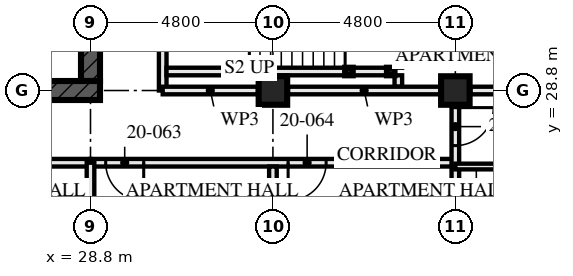
"""IFC4 building model, lengths in metres.
Left out: names, types, materials, properties, quantities, classifications, styles, units other than length and angle.
Written with IfcOpenShell. Run it as: python <this file> out.ifc"""

import sys

from ifc_helpers import new_model, si_unit, direction, frame, frame_2d, origin, origin_2d, place, context, subcontext, project, spatial, rectangle, hollow_rectangle, extrude, element, fill, save


model = new_model("IFC4")
c1 = context("Model", 3, precision=1e-05, world=origin(), true_north=direction((0.0, 1.0)))
c2 = subcontext(c1, "Body", "Model", "MODEL_VIEW")
j1 = project(units=[si_unit("LENGTHUNIT", "METRE"), si_unit("PLANEANGLEUNIT", "RADIAN")], contexts=[c1])
p1 = place(None, origin())
s1 = spatial("IfcSite", under=j1, at=p1, CompositionType="ELEMENT")
p2 = place(p1, origin())
s2 = spatial("IfcBuilding", under=s1, at=p2, CompositionType="ELEMENT")
p3 = place(p2, frame((0.0, 0.0, 76.0)))
s3 = spatial("IfcBuildingStorey", under=s2, at=p3, CompositionType="ELEMENT", Elevation=76.0)
for number, where, z_axis, x_axis in (
    (1, (33.6, 28.8, 0.0), (0.0, 0.0, 1.0), (0.0, 1.0, 0.0)),
    (2, (38.4, 28.8, 0.0), (0.0, 0.0, 1.0), (0.0, 1.0, 0.0)),
):
    element("IfcColumn", number, at=place(p3, frame(where, z_axis=z_axis, x_axis=x_axis)), inside=s3, PredefinedType="COLUMN", context=c2, shape_type="SweptSolid", body=[
        extrude(hollow_rectangle(XDim=0.75, YDim=0.75, WallThickness=0.08, at=origin_2d()), origin(), (0.0, 0.0, 1.0), 3.5),
    ])
p4 = place(p3, frame((14.15, 28.8, -0.17), z_axis=(0.0, 0.0, 1.0), x_axis=(1.0, 0.0, 0.0)))
e3 = element("IfcWall", 3, at=p4, inside=s3, PredefinedType="SHEAR", context=c2, shape_type="SweptSolid", body=[
    extrude(rectangle(XDim=14.9, YDim=0.5, at=frame_2d((7.45, 0.0))), origin(), (0.0, 0.0, 1.0), 3.42),
])
p5 = place(p4, frame((6.85, 0.0, 0.17)))
e4 = element("IfcOpeningElement", 4, at=p5, cuts=e3, PredefinedType="OPENING", context=c2, shape_type="SweptSolid", body=[
    extrude(rectangle(XDim=1.2, YDim=2.1, at=frame_2d((0.6, 1.05))), frame((0.0, 0.26, 0.0), z_axis=(0.0, -1.0, 0.0), x_axis=(1.0, 0.0, 0.0)), (0.0, 0.0, 1.0), 0.521),
])
p6 = place(p3, frame((28.8, 29.05, -0.17), z_axis=(0.0, 0.0, 1.0), x_axis=(0.0, 1.0, 0.0)))
e5 = element("IfcWall", 5, at=p6, inside=s3, PredefinedType="SHEAR", context=c2, shape_type="SweptSolid", body=[
    extrude(rectangle(XDim=13.9, YDim=0.5, at=frame_2d((6.95, 0.0))), origin(), (0.0, 0.0, 1.0), 3.42),
])
p7 = place(p6, frame((6.35, 0.0, 0.17)))
e6 = element("IfcOpeningElement", 6, at=p7, cuts=e5, PredefinedType="OPENING", context=c2, shape_type="SweptSolid", body=[
    extrude(rectangle(XDim=1.2, YDim=2.1, at=frame_2d((0.6, 1.05))), frame((0.0, 0.26, 0.0), z_axis=(0.0, -1.0, 0.0), x_axis=(1.0, 0.0, 0.0)), (0.0, 0.0, 1.0), 0.521),
])
for number, where, z_axis, x_axis in (
    (7, (36.7, 29.3, 0.0), (0.0, 0.0, 1.0), (1.0, 0.0, 0.0)),
    (8, (35.6, 29.3, 0.0), (0.0, 0.0, 1.0), (1.0, 0.0, 0.0)),
):
    element("IfcColumn", number, at=place(p3, frame(where, z_axis=z_axis, x_axis=x_axis)), inside=s3, PredefinedType="COLUMN", context=c2, shape_type="SweptSolid", body=[
        extrude(hollow_rectangle(XDim=0.2, YDim=0.2, WallThickness=0.008, at=origin_2d()), origin(), (0.0, 0.0, 1.0), 3.25),
    ])
p8 = place(p3, frame((14.4, 26.9, 0.0), z_axis=(0.0, 0.0, 1.0), x_axis=(1.0, 0.0, 0.0)))
e9 = element("IfcWall", 9, at=p8, inside=s3, PredefinedType="PARTITIONING", context=c2, shape_type="SweptSolid", body=[
    extrude(rectangle(XDim=14.4, YDim=0.2, at=frame_2d((7.2, 0.0))), origin(), (0.0, 0.0, 1.0), 2.04),
])
p9 = place(p8, frame((1.4, 0.0, 0.0)))
e10 = element("IfcOpeningElement", 10, at=p9, cuts=e9, PredefinedType="OPENING", context=c2, shape_type="SweptSolid", body=[
    extrude(rectangle(XDim=1.0, YDim=2.0, at=frame_2d((0.5, 1.0))), frame((0.0, 0.111, 0.0), z_axis=(0.0, -1.0, 0.0), x_axis=(1.0, 0.0, 0.0)), (0.0, 0.0, 1.0), 0.221),
])
p10 = place(p8, frame((3.65, 0.0, 0.0)))
e11 = element("IfcOpeningElement", 11, at=p10, cuts=e9, PredefinedType="OPENING", context=c2, shape_type="SweptSolid", body=[
    extrude(rectangle(XDim=0.9, YDim=2.0, at=frame_2d((0.45, 1.0))), frame((0.0, 0.111, 0.0), z_axis=(0.0, -1.0, 0.0), x_axis=(1.0, 0.0, 0.0)), (0.0, 0.0, 1.0), 0.221),
])
p11 = place(p8, frame((5.2, 0.0, 0.0)))
e12 = element("IfcOpeningElement", 12, at=p11, cuts=e9, PredefinedType="OPENING", context=c2, shape_type="SweptSolid", body=[
    extrude(rectangle(XDim=1.0, YDim=2.0, at=frame_2d((0.5, 1.0))), frame((0.0, 0.111, 0.0), z_axis=(0.0, -1.0, 0.0), x_axis=(1.0, 0.0, 0.0)), (0.0, 0.0, 1.0), 0.221),
])
p12 = place(p8, frame((10.0, 0.0, 0.0)))
e13 = element("IfcOpeningElement", 13, at=p12, cuts=e9, PredefinedType="OPENING", context=c2, shape_type="SweptSolid", body=[
    extrude(rectangle(XDim=1.0, YDim=2.0, at=frame_2d((0.5, 1.0))), frame((0.0, 0.111, 0.0), z_axis=(0.0, -1.0, 0.0), x_axis=(1.0, 0.0, 0.0)), (0.0, 0.0, 1.0), 0.221),
])
p13 = place(p3, frame((33.6, 14.72, 0.0), z_axis=(0.0, 0.0, 1.0), x_axis=(0.0, 1.0, 0.0)))
e14 = element("IfcWall", 14, at=p13, inside=s3, PredefinedType="PARTITIONING", context=c2, shape_type="SweptSolid", body=[
    extrude(rectangle(XDim=12.08, YDim=0.2, at=frame_2d((6.04, 0.0))), origin(), (0.0, 0.0, 1.0), 2.04),
])
p14 = place(p3, frame((38.4, 19.52, 0.0), z_axis=(0.0, 0.0, 1.0), x_axis=(0.0, 1.0, 0.0)))
e15 = element("IfcWall", 15, at=p14, inside=s3, PredefinedType="PARTITIONING", context=c2, shape_type="SweptSolid", body=[
    extrude(rectangle(XDim=7.28, YDim=0.2, at=frame_2d((3.64, 0.0))), origin(), (0.0, 0.0, 1.0), 2.04),
])
p15 = place(p3, frame((38.4, 26.8, 0.0), z_axis=(0.0, 0.0, 1.0), x_axis=(1.0, 0.0, 0.0)))
e16 = element("IfcWall", 16, at=p15, inside=s3, PredefinedType="PARTITIONING", context=c2, shape_type="SweptSolid", body=[
    extrude(rectangle(XDim=2.8, YDim=0.15, at=frame_2d((1.4, 0.0))), origin(), (0.0, 0.0, 1.0), 3.25),
])
p16 = place(p3, frame((28.8, 26.9, 0.0), z_axis=(0.0, 0.0, 1.0), x_axis=(1.0, 0.0, 0.0)))
e17 = element("IfcWall", 17, at=p16, inside=s3, PredefinedType="PARTITIONING", context=c2, shape_type="SweptSolid", body=[
    extrude(rectangle(XDim=9.6, YDim=0.2, at=frame_2d((4.8, 0.0))), origin(), (0.0, 0.0, 1.0), 3.25),
])
p17 = place(p16, frame((0.4, 0.0, 0.0)))
e18 = element("IfcOpeningElement", 18, at=p17, cuts=e17, PredefinedType="OPENING", context=c2, shape_type="SweptSolid", body=[
    extrude(rectangle(XDim=1.0, YDim=2.1, at=frame_2d((0.5, 1.05))), frame((0.0, 0.111, 0.0), z_axis=(0.0, -1.0, 0.0), x_axis=(1.0, 0.0, 0.0)), (0.0, 0.0, 1.0), 0.221),
])
p18 = place(p16, frame((5.2, 0.0, 0.0)))
e19 = element("IfcOpeningElement", 19, at=p18, cuts=e17, PredefinedType="OPENING", context=c2, shape_type="SweptSolid", body=[
    extrude(rectangle(XDim=1.0, YDim=2.1, at=frame_2d((0.5, 1.05))), frame((0.0, 0.111, 0.0), z_axis=(0.0, -1.0, 0.0), x_axis=(1.0, 0.0, 0.0)), (0.0, 0.0, 1.0), 0.221),
])
p19 = place(p3, frame((38.4, 26.8, 0.0), z_axis=(0.0, 0.0, 1.0), x_axis=(0.0, 1.0, 0.0)))
e20 = element("IfcWall", 20, at=p19, inside=s3, PredefinedType="PARTITIONING", context=c2, shape_type="SweptSolid", body=[
    extrude(rectangle(XDim=1.605, YDim=0.2, at=frame_2d((0.802, 0.0))), origin(), (0.0, 0.0, 1.0), 3.25),
])
p20 = place(p19, frame((0.55, 0.0, 0.0)))
e21 = element("IfcOpeningElement", 21, at=p20, cuts=e20, PredefinedType="OPENING", context=c2, shape_type="SweptSolid", body=[
    extrude(rectangle(XDim=1.0, YDim=2.1, at=frame_2d((0.5, 1.05))), frame((0.0, 0.111, 0.0), z_axis=(0.0, -1.0, 0.0), x_axis=(1.0, 0.0, 0.0)), (0.0, 0.0, 1.0), 0.221),
])
p21 = place(p3, frame((36.6, 29.3, 0.0), z_axis=(0.0, 0.0, 1.0), x_axis=(-1.0, 0.0, 0.0)))
e22 = element("IfcWall", 22, at=p21, inside=s3, PredefinedType="SOLIDWALL", context=c2, shape_type="SweptSolid", body=[
    extrude(rectangle(XDim=0.9, YDim=0.2, at=frame_2d((0.45, 0.0))), origin(), (0.0, 0.0, 1.0), 2.94),
])
p22 = place(p3, frame((35.5, 29.3, 0.0), z_axis=(0.0, 0.0, 1.0), x_axis=(-1.0, 0.0, 0.0)))
e23 = element("IfcWall", 23, at=p22, inside=s3, PredefinedType="SOLIDWALL", context=c2, shape_type="SweptSolid", body=[
    extrude(rectangle(XDim=4.7, YDim=0.2, at=frame_2d((2.35, 0.0))), origin(), (0.0, 0.0, 1.0), 2.94),
])
p23 = place(p3, frame((36.9, 28.9, 0.0), z_axis=(0.0, 0.0, 1.0), x_axis=(0.0, 1.0, 0.0)))
e24 = element("IfcWall", 24, at=p23, inside=s3, PredefinedType="SOLIDWALL", context=c2, shape_type="SweptSolid", body=[
    extrude(rectangle(XDim=0.3, YDim=0.2, at=frame_2d((0.15, 0.0))), origin(), (0.0, 0.0, 1.0), 3.25),
])
p24 = place(p3, frame((36.9, 29.4, 0.0), z_axis=(0.0, 0.0, 1.0), x_axis=(0.0, 1.0, 0.0)))
e25 = element("IfcWall", 25, at=p24, inside=s3, PredefinedType="SOLIDWALL", context=c2, shape_type="SweptSolid", body=[
    extrude(rectangle(XDim=2.6, YDim=0.2, at=frame_2d((1.3, 0.0))), origin(), (0.0, 0.0, 1.0), 3.25),
])
p25 = place(p3, frame((30.7, 28.8, 0.0), z_axis=(0.0, 0.0, 1.0), x_axis=(0.0, 1.0, 0.0)))
e26 = element("IfcWall", 26, at=p25, inside=s3, PredefinedType="PARTITIONING", context=c2, shape_type="SweptSolid", body=[
    extrude(rectangle(XDim=14.4, YDim=0.2, at=frame_2d((7.2, 0.0))), origin(), (0.0, 0.0, 1.0), 2.04),
])
p26 = place(p25, frame((1.4, 0.0, 0.0)))
e27 = element("IfcOpeningElement", 27, at=p26, cuts=e26, PredefinedType="OPENING", context=c2, shape_type="SweptSolid", body=[
    extrude(rectangle(XDim=1.0, YDim=2.0, at=frame_2d((0.5, 1.0))), frame((0.0, 0.111, 0.0), z_axis=(0.0, -1.0, 0.0), x_axis=(1.0, 0.0, 0.0)), (0.0, 0.0, 1.0), 0.221),
])
p27 = place(p25, frame((4.1, 0.0, 0.0)))
e28 = element("IfcOpeningElement", 28, at=p27, cuts=e26, PredefinedType="OPENING", context=c2, shape_type="SweptSolid", body=[
    extrude(rectangle(XDim=1.0, YDim=2.0, at=frame_2d((0.5, 1.0))), frame((0.0, 0.111, 0.0), z_axis=(0.0, -1.0, 0.0), x_axis=(1.0, 0.0, 0.0)), (0.0, 0.0, 1.0), 0.221),
])
p28 = place(p25, frame((5.975, 0.0, 0.0)))
e29 = element("IfcOpeningElement", 29, at=p28, cuts=e26, PredefinedType="OPENING", context=c2, shape_type="SweptSolid", body=[
    extrude(rectangle(XDim=1.0, YDim=2.0, at=frame_2d((0.5, 1.0))), frame((0.0, 0.111, 0.0), z_axis=(0.0, -1.0, 0.0), x_axis=(1.0, 0.0, 0.0)), (0.0, 0.0, 1.0), 0.221),
])
p29 = place(p25, frame((10.0, 0.0, 0.0)))
e30 = element("IfcOpeningElement", 30, at=p29, cuts=e26, PredefinedType="OPENING", context=c2, shape_type="SweptSolid", body=[
    extrude(rectangle(XDim=1.0, YDim=2.0, at=frame_2d((0.5, 1.0))), frame((0.0, 0.111, 0.0), z_axis=(0.0, -1.0, 0.0), x_axis=(1.0, 0.0, 0.0)), (0.0, 0.0, 1.0), 0.221),
])
p30 = place(p3, frame((28.8, 24.395, 0.0), z_axis=(0.0, 0.0, 1.0), x_axis=(0.0, 1.0, 0.0)))
e31 = element("IfcWall", 31, at=p30, inside=s3, PredefinedType="PARTITIONING", context=c2, shape_type="SweptSolid", body=[
    extrude(rectangle(XDim=2.505, YDim=0.2, at=frame_2d((1.252, 0.0))), origin(), (0.0, 0.0, 1.0), 2.04),
])
p31 = place(p3, frame((42.88, 28.8, 0.0), z_axis=(0.0, 0.0, 1.0), x_axis=(-1.0, 0.0, 0.0)))
e32 = element("IfcWall", 32, at=p31, inside=s3, PredefinedType="PARTITIONING", context=c2, shape_type="SweptSolid", body=[
    extrude(rectangle(XDim=4.085, YDim=0.2, at=frame_2d((2.042, 0.0))), origin(), (0.0, 0.0, 1.0), 2.04),
])
p32 = place(p3, frame((38.005, 28.8, 0.0), z_axis=(0.0, 0.0, 1.0), x_axis=(-1.0, 0.0, 0.0)))
e33 = element("IfcWall", 33, at=p32, inside=s3, PredefinedType="PARTITIONING", context=c2, shape_type="SweptSolid", body=[
    extrude(rectangle(XDim=4.01, YDim=0.2, at=frame_2d((2.005, 0.0))), origin(), (0.0, 0.0, 1.0), 2.04),
])
p33 = place(p3, frame((33.205, 28.8, 0.0), z_axis=(0.0, 0.0, 1.0), x_axis=(-1.0, 0.0, 0.0)))
e34 = element("IfcWall", 34, at=p33, inside=s3, PredefinedType="PARTITIONING", context=c2, shape_type="SweptSolid", body=[
    extrude(rectangle(XDim=2.505, YDim=0.2, at=frame_2d((1.252, 0.0))), origin(), (0.0, 0.0, 1.0), 2.04),
])
p34 = place(p17, frame((1.0, 0.0, 0.0), z_axis=(0.0, 0.0, 1.0), x_axis=(-1.0, 0.0, 0.0)))
e35 = element("IfcDoor", 35, at=p34, inside=s3, OperationType="SINGLE_SWING_RIGHT", PredefinedType="DOOR", context=c2, shape_type="SweptSolid", body=[
    extrude(rectangle(XDim=1.0, YDim=2.1, at=frame_2d((0.5, 1.05))), frame((0.0, 0.027, 0.0), z_axis=(0.0, -1.0, 0.0), x_axis=(1.0, 0.0, 0.0)), (0.0, 0.0, 1.0), 0.054),
])
fill(e18, e35)
p35 = place(p18, frame((1.0, 0.0, 0.0), z_axis=(0.0, 0.0, 1.0), x_axis=(-1.0, 0.0, 0.0)))
e36 = element("IfcDoor", 36, at=p35, inside=s3, OperationType="SINGLE_SWING_LEFT", PredefinedType="DOOR", context=c2, shape_type="SweptSolid", body=[
    extrude(rectangle(XDim=1.0, YDim=2.1, at=frame_2d((0.5, 1.05))), frame((0.0, 0.027, 0.0), z_axis=(0.0, -1.0, 0.0), x_axis=(1.0, 0.0, 0.0)), (0.0, 0.0, 1.0), 0.054),
])
fill(e19, e36)
p36 = place(p20, frame((1.0, 0.0, 0.0), z_axis=(0.0, 0.0, 1.0), x_axis=(-1.0, 0.0, 0.0)))
e37 = element("IfcDoor", 37, at=p36, inside=s3, OperationType="SINGLE_SWING_RIGHT", PredefinedType="DOOR", context=c2, shape_type="SweptSolid", body=[
    extrude(rectangle(XDim=1.0, YDim=2.1, at=frame_2d((0.5, 1.05))), frame((0.0, 0.027, 0.0), z_axis=(0.0, -1.0, 0.0), x_axis=(1.0, 0.0, 0.0)), (0.0, 0.0, 1.0), 0.054),
])
fill(e21, e37)
save(model, sys.argv[1])
